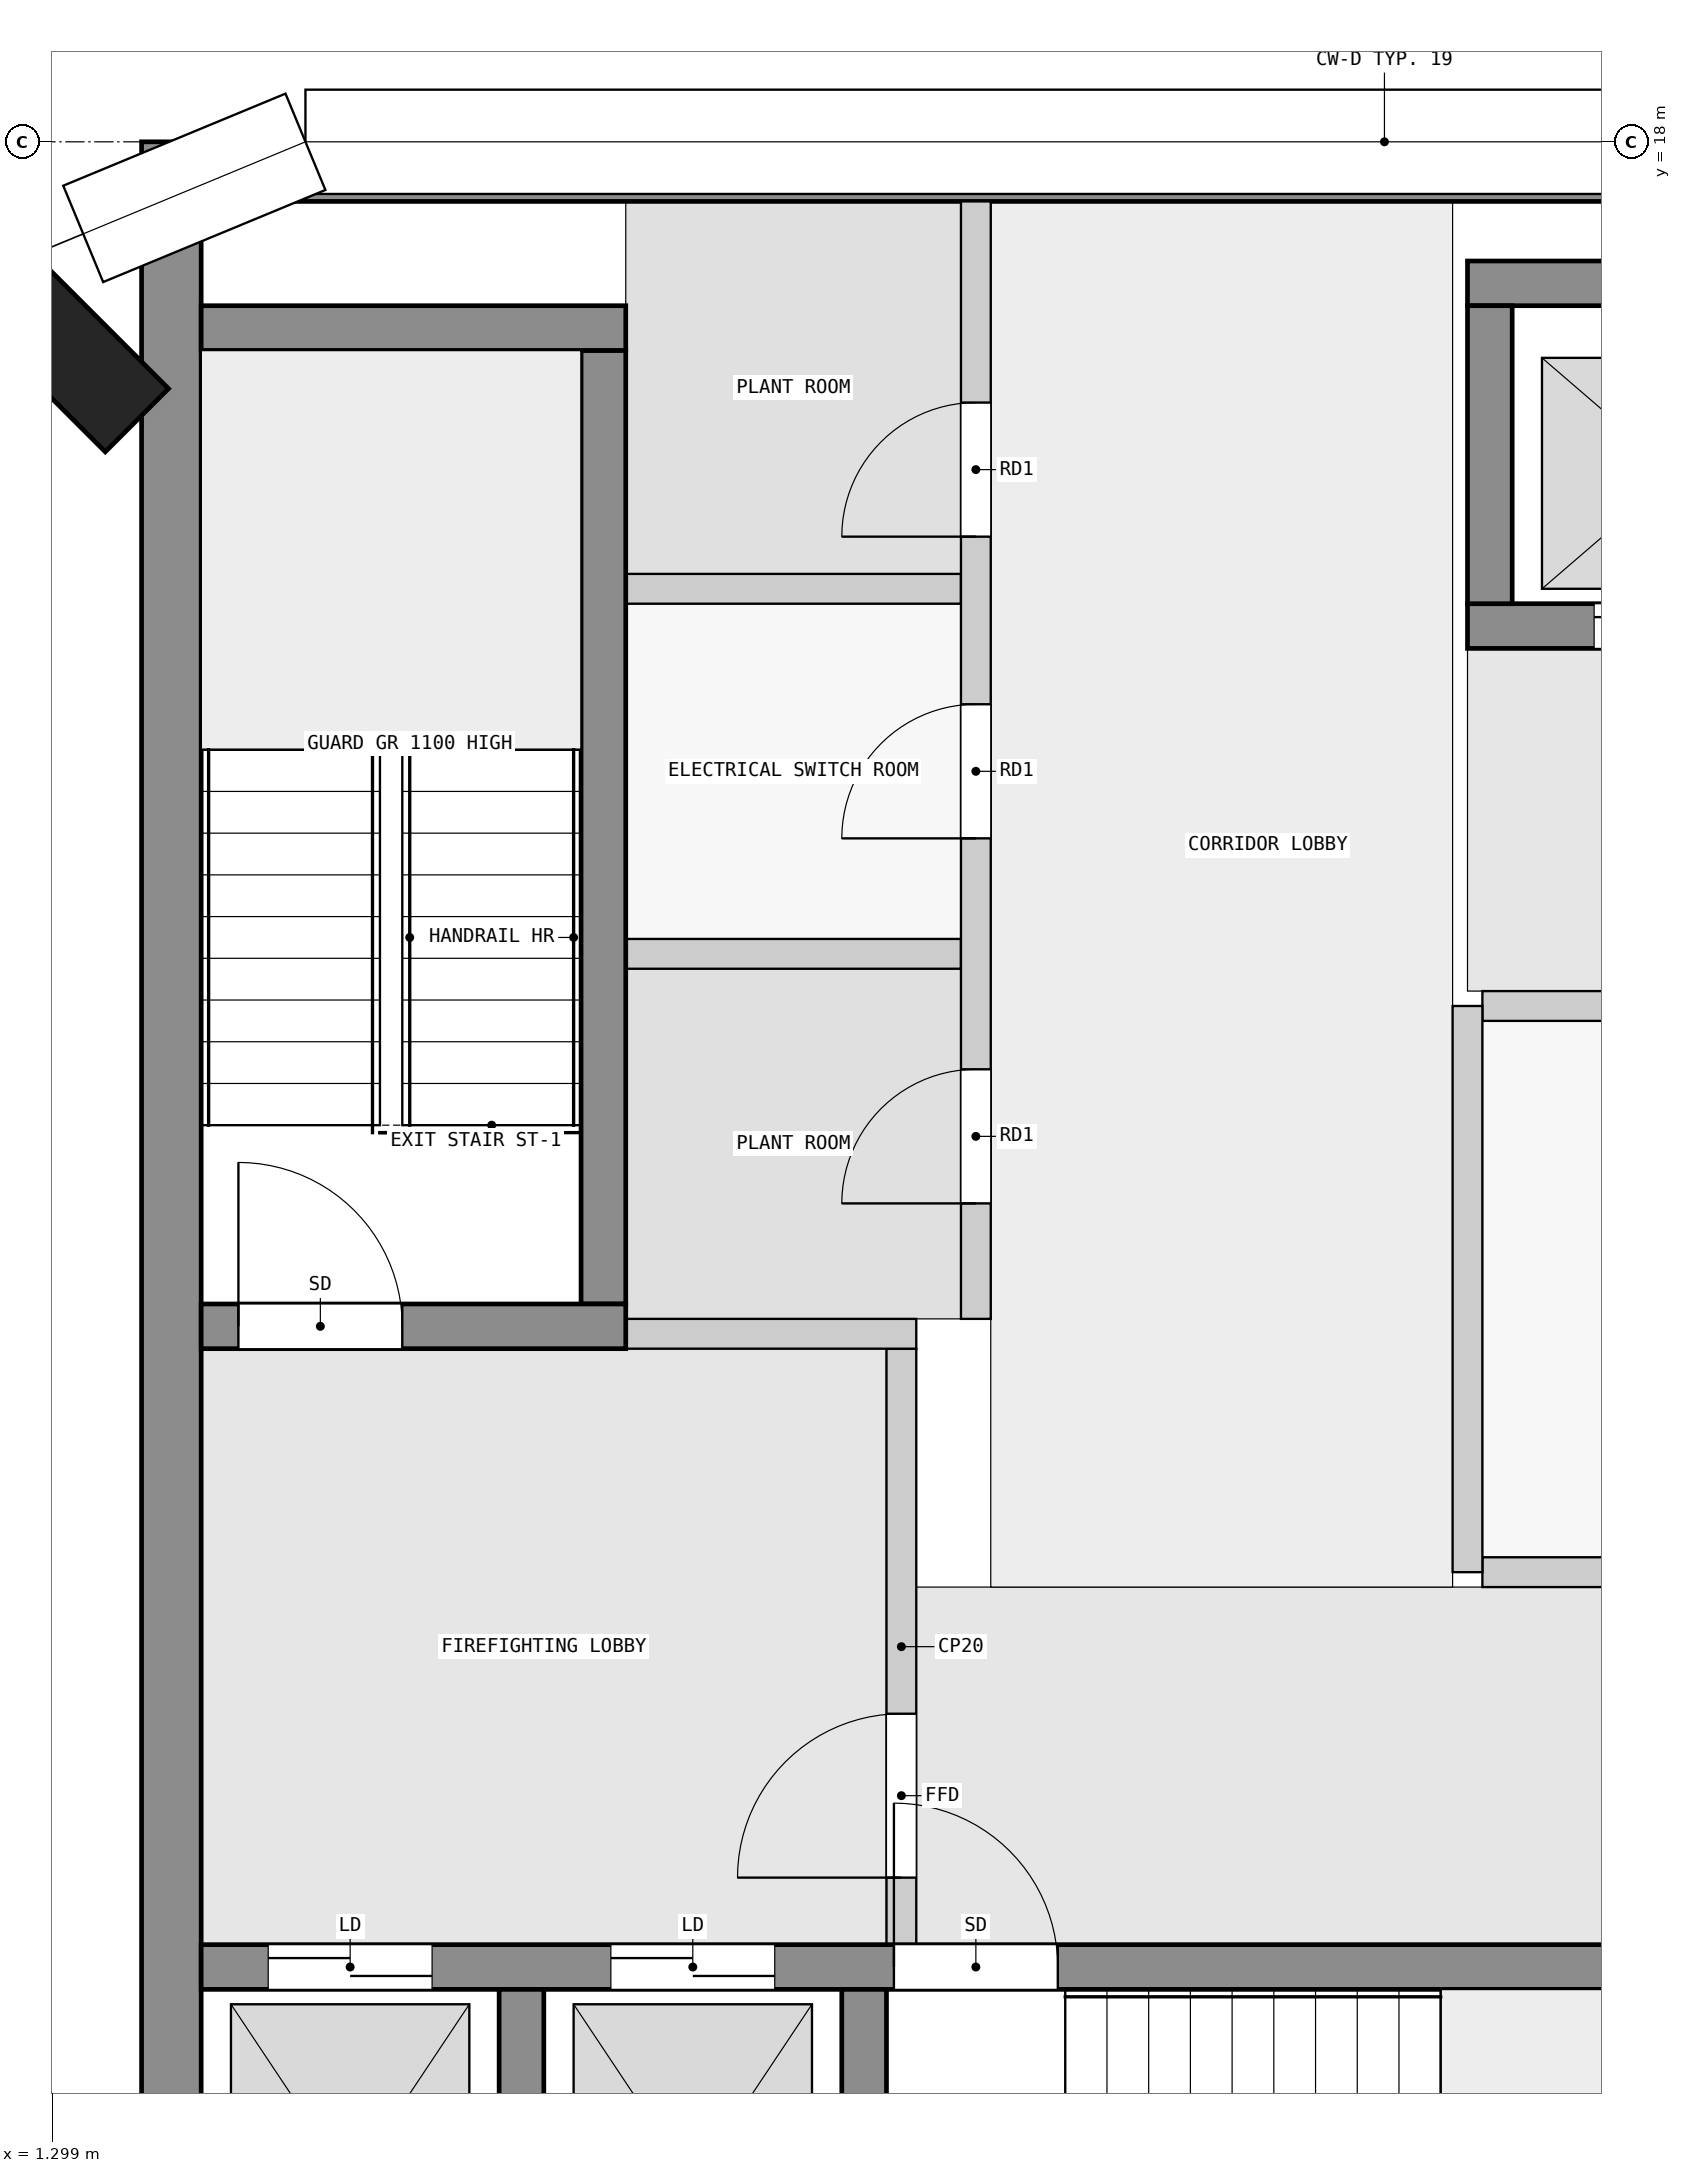
"""IFC4 building model, lengths in metres.
Left out: names, types, materials, properties, quantities, classifications, styles, units other than length and angle.
Written with IfcOpenShell. Run it as: python <this file> out.ifc"""

import sys

from ifc_helpers import new_model, si_unit, direction, frame, frame_2d, origin, origin_2d, place, context, subcontext, project, spatial, rectangle, extrude, element, fill, save


model = new_model("IFC4")
c1 = context("Model", 3, precision=1e-05, world=origin(), true_north=direction((0.0, 1.0)))
c2 = subcontext(c1, "Body", "Model", "MODEL_VIEW")
j1 = project(units=[si_unit("LENGTHUNIT", "METRE"), si_unit("PLANEANGLEUNIT", "RADIAN")], contexts=[c1])
p1 = place(None, origin())
s1 = spatial("IfcSite", under=j1, at=p1, CompositionType="ELEMENT")
p2 = place(p1, origin())
s2 = spatial("IfcBuilding", under=s1, at=p2, CompositionType="ELEMENT")
p3 = place(p2, frame((0.0, 0.0, 308.9)))
s3 = spatial("IfcBuildingStorey", under=s2, at=p3, CompositionType="ELEMENT", Elevation=308.9)
p4 = place(p3, frame((1.374, 16.626, 0.0), z_axis=(0.0, 0.0, 1.0), x_axis=(0.707106781187, 0.707106781187, 0.0)))
e1 = element("IfcColumn", 1, at=p4, inside=s3, PredefinedType="COLUMN", context=c2, shape_type="SweptSolid", body=[
    extrude(rectangle(XDim=0.6, YDim=1.4, at=origin_2d()), origin(), (0.0, 0.0, 1.0), 3.5),
])
p5 = place(p3, frame((1.9, 17.8, 0.0), z_axis=(0.0, 0.0, 1.0), x_axis=(1.0, 0.0, 0.0)))
e2 = element("IfcWall", 2, at=p5, inside=s3, PredefinedType="SHEAR", context=c2, shape_type="SweptSolid", body=[
    extrude(rectangle(XDim=20.6, YDim=0.4, at=frame_2d((10.3, 0.0))), origin(), (0.0, 0.0, 1.0), 3.2),
])
p6 = place(p3, frame((2.1, 2.5, 0.0), z_axis=(0.0, 0.0, 1.0), x_axis=(0.0, 1.0, 0.0)))
e3 = element("IfcWall", 3, at=p6, inside=s3, PredefinedType="SHEAR", context=c2, shape_type="SweptSolid", body=[
    extrude(rectangle(XDim=15.1, YDim=0.4, at=frame_2d((7.55, 0.0))), origin(), (0.0, 0.0, 1.0), 3.2),
])
for number, where, z_axis, x_axis in (
    (4, (4.45, 2.8, 0.0), (0.0, 0.0, 1.0), (0.0, 1.0, 0.0)),
    (5, (6.75, 2.8, 0.0), (0.0, 0.0, 1.0), (0.0, 1.0, 0.0)),
):
    element("IfcWall", number, at=place(p3, frame(where, z_axis=z_axis, x_axis=x_axis)), inside=s3, PredefinedType="SHEAR", context=c2, shape_type="SweptSolid", body=[
        extrude(rectangle(XDim=2.8, YDim=0.3, at=frame_2d((1.4, 0.0))), origin(), (0.0, 0.0, 1.0), 3.2),
    ])
p7 = place(p3, frame((2.3, 5.75, 0.0), z_axis=(0.0, 0.0, 1.0), x_axis=(1.0, 0.0, 0.0)))
e6 = element("IfcWall", 6, at=p7, inside=s3, PredefinedType="SHEAR", context=c2, shape_type="SweptSolid", body=[
    extrude(rectangle(XDim=18.8, YDim=0.3, at=frame_2d((9.4, 0.0))), origin(), (0.0, 0.0, 1.0), 3.2),
])
p8 = place(p7, frame((4.65, 0.0, 0.0)))
e7 = element("IfcOpeningElement", 7, at=p8, cuts=e6, PredefinedType="OPENING", context=c2, shape_type="SweptSolid", body=[
    extrude(rectangle(XDim=1.1, YDim=2.1, at=frame_2d((0.55, 1.05))), frame((0.0, 0.16, 0.0), z_axis=(0.0, -1.0, 0.0), x_axis=(1.0, 0.0, 0.0)), (0.0, 0.0, 1.0), 0.32),
])
p9 = place(p7, frame((0.45, 0.0, 0.0)))
e8 = element("IfcOpeningElement", 8, at=p9, cuts=e6, PredefinedType="OPENING", context=c2, shape_type="SweptSolid", body=[
    extrude(rectangle(XDim=1.1, YDim=2.1, at=frame_2d((0.55, 1.05))), frame((0.0, 0.16, 0.0), z_axis=(0.0, -1.0, 0.0), x_axis=(1.0, 0.0, 0.0)), (0.0, 0.0, 1.0), 0.32),
])
p10 = place(p7, frame((2.75, 0.0, 0.0)))
e9 = element("IfcOpeningElement", 9, at=p10, cuts=e6, PredefinedType="OPENING", context=c2, shape_type="SweptSolid", body=[
    extrude(rectangle(XDim=1.1, YDim=2.1, at=frame_2d((0.55, 1.05))), frame((0.0, 0.16, 0.0), z_axis=(0.0, -1.0, 0.0), x_axis=(1.0, 0.0, 0.0)), (0.0, 0.0, 1.0), 0.32),
])
p11 = place(p7, frame((13.2, 0.0, 0.0)))
e10 = element("IfcOpeningElement", 10, at=p11, cuts=e6, PredefinedType="OPENING", context=c2, shape_type="SweptSolid", body=[
    extrude(rectangle(XDim=0.9, YDim=2.1, at=frame_2d((0.45, 1.05))), frame((0.0, 0.16, 0.0), z_axis=(0.0, -1.0, 0.0), x_axis=(1.0, 0.0, 0.0)), (0.0, 0.0, 1.0), 0.32),
])
p12 = place(p7, frame((16.95, 0.0, 0.0)))
e11 = element("IfcOpeningElement", 11, at=p12, cuts=e6, PredefinedType="OPENING", context=c2, shape_type="SweptSolid", body=[
    extrude(rectangle(XDim=0.9, YDim=2.1, at=frame_2d((0.45, 1.05))), frame((0.0, 0.16, 0.0), z_axis=(0.0, -1.0, 0.0), x_axis=(1.0, 0.0, 0.0)), (0.0, 0.0, 1.0), 0.32),
])
p13 = place(p3, frame((2.3, 10.05, 0.0), z_axis=(0.0, 0.0, 1.0), x_axis=(1.0, 0.0, 0.0)))
e12 = element("IfcWall", 12, at=p13, inside=s3, PredefinedType="SHEAR", context=c2, shape_type="SweptSolid", body=[
    extrude(rectangle(XDim=2.85, YDim=0.3, at=frame_2d((1.425, 0.0))), origin(), (0.0, 0.0, 1.0), 3.2),
])
p14 = place(p13, frame((0.25, 0.0, 0.0)))
e13 = element("IfcOpeningElement", 13, at=p14, cuts=e12, PredefinedType="OPENING", context=c2, shape_type="SweptSolid", body=[
    extrude(rectangle(XDim=1.1, YDim=2.1, at=frame_2d((0.55, 1.05))), frame((0.0, 0.16, 0.0), z_axis=(0.0, -1.0, 0.0), x_axis=(1.0, 0.0, 0.0)), (0.0, 0.0, 1.0), 0.32),
])
p15 = place(p3, frame((5.0, 10.2, 0.0), z_axis=(0.0, 0.0, 1.0), x_axis=(0.0, 1.0, 0.0)))
e14 = element("IfcWall", 14, at=p15, inside=s3, PredefinedType="SHEAR", context=c2, shape_type="SweptSolid", body=[
    extrude(rectangle(XDim=6.4, YDim=0.3, at=frame_2d((3.2, 0.0))), origin(), (0.0, 0.0, 1.0), 3.2),
])
p16 = place(p3, frame((2.3, 16.75, 0.0), z_axis=(0.0, 0.0, 1.0), x_axis=(1.0, 0.0, 0.0)))
e15 = element("IfcWall", 15, at=p16, inside=s3, PredefinedType="SHEAR", context=c2, shape_type="SweptSolid", body=[
    extrude(rectangle(XDim=2.85, YDim=0.3, at=frame_2d((1.425, 0.0))), origin(), (0.0, 0.0, 1.0), 3.2),
])
p17 = place(p3, frame((10.8, 17.05, 0.0), z_axis=(0.0, 0.0, 1.0), x_axis=(1.0, 0.0, 0.0)))
e16 = element("IfcWall", 16, at=p17, inside=s3, PredefinedType="SHEAR", context=c2, shape_type="SweptSolid", body=[
    extrude(rectangle(XDim=7.8, YDim=0.3, at=frame_2d((3.9, 0.0))), origin(), (0.0, 0.0, 1.0), 3.2),
])
p18 = place(p3, frame((10.8, 14.75, 0.0), z_axis=(0.0, 0.0, 1.0), x_axis=(1.0, 0.0, 0.0)))
e17 = element("IfcWall", 17, at=p18, inside=s3, PredefinedType="SHEAR", context=c2, shape_type="SweptSolid", body=[
    extrude(rectangle(XDim=7.8, YDim=0.3, at=frame_2d((3.9, 0.0))), origin(), (0.0, 0.0, 1.0), 3.2),
])
p19 = place(p18, frame((0.85, 0.0, 0.0)))
e18 = element("IfcOpeningElement", 18, at=p19, cuts=e17, PredefinedType="OPENING", context=c2, shape_type="SweptSolid", body=[
    extrude(rectangle(XDim=1.1, YDim=2.1, at=frame_2d((0.55, 1.05))), frame((0.0, 0.16, 0.0), z_axis=(0.0, -1.0, 0.0), x_axis=(1.0, 0.0, 0.0)), (0.0, 0.0, 1.0), 0.32),
])
p20 = place(p18, frame((3.35, 0.0, 0.0)))
e19 = element("IfcOpeningElement", 19, at=p20, cuts=e17, PredefinedType="OPENING", context=c2, shape_type="SweptSolid", body=[
    extrude(rectangle(XDim=1.1, YDim=2.1, at=frame_2d((0.55, 1.05))), frame((0.0, 0.16, 0.0), z_axis=(0.0, -1.0, 0.0), x_axis=(1.0, 0.0, 0.0)), (0.0, 0.0, 1.0), 0.32),
])
p21 = place(p18, frame((5.85, 0.0, 0.0)))
e20 = element("IfcOpeningElement", 20, at=p21, cuts=e17, PredefinedType="OPENING", context=c2, shape_type="SweptSolid", body=[
    extrude(rectangle(XDim=1.1, YDim=2.1, at=frame_2d((0.55, 1.05))), frame((0.0, 0.16, 0.0), z_axis=(0.0, -1.0, 0.0), x_axis=(1.0, 0.0, 0.0)), (0.0, 0.0, 1.0), 0.32),
])
p22 = place(p3, frame((10.95, 14.9, 0.0), z_axis=(0.0, 0.0, 1.0), x_axis=(0.0, 1.0, 0.0)))
e21 = element("IfcWall", 21, at=p22, inside=s3, PredefinedType="SHEAR", context=c2, shape_type="SweptSolid", body=[
    extrude(rectangle(XDim=2.0, YDim=0.3, at=frame_2d((1.0, 0.0))), origin(), (0.0, 0.0, 1.0), 3.2),
])
p23 = place(p3, frame((7.0, 5.9, 0.0), z_axis=(0.0, 0.0, 1.0), x_axis=(0.0, 1.0, 0.0)))
e22 = element("IfcWall", 22, at=p23, inside=s3, PredefinedType="PARTITIONING", context=c2, shape_type="SweptSolid", body=[
    extrude(rectangle(XDim=4.0, YDim=0.2, at=frame_2d((2.0, 0.0))), origin(), (0.0, 0.0, 1.0), 3.2),
])
p24 = place(p23, frame((0.45, 0.0, 0.0)))
e23 = element("IfcOpeningElement", 23, at=p24, cuts=e22, PredefinedType="OPENING", context=c2, shape_type="SweptSolid", body=[
    extrude(rectangle(XDim=1.1, YDim=2.1, at=frame_2d((0.55, 1.05))), frame((0.0, 0.11, 0.0), z_axis=(0.0, -1.0, 0.0), x_axis=(1.0, 0.0, 0.0)), (0.0, 0.0, 1.0), 0.22),
])
p25 = place(p3, frame((5.15, 10.0, 0.0), z_axis=(0.0, 0.0, 1.0), x_axis=(1.0, 0.0, 0.0)))
e24 = element("IfcWall", 24, at=p25, inside=s3, PredefinedType="PARTITIONING", context=c2, shape_type="SweptSolid", body=[
    extrude(rectangle(XDim=1.95, YDim=0.2, at=frame_2d((0.975, 0.0))), origin(), (0.0, 0.0, 1.0), 3.2),
])
p26 = place(p3, frame((10.8, 8.4, 0.0), z_axis=(0.0, 0.0, 1.0), x_axis=(0.0, 1.0, 0.0)))
e25 = element("IfcWall", 25, at=p26, inside=s3, PredefinedType="PARTITIONING", context=c2, shape_type="SweptSolid", body=[
    extrude(rectangle(XDim=3.8, YDim=0.2, at=frame_2d((1.9, 0.0))), origin(), (0.0, 0.0, 1.0), 3.2),
])
p27 = place(p3, frame((10.9, 8.4, 0.0), z_axis=(0.0, 0.0, 1.0), x_axis=(1.0, 0.0, 0.0)))
e26 = element("IfcWall", 26, at=p27, inside=s3, PredefinedType="PARTITIONING", context=c2, shape_type="SweptSolid", body=[
    extrude(rectangle(XDim=8.7, YDim=0.2, at=frame_2d((4.35, 0.0))), origin(), (0.0, 0.0, 1.0), 3.2),
])
p28 = place(p3, frame((10.9, 12.2, 0.0), z_axis=(0.0, 0.0, 1.0), x_axis=(1.0, 0.0, 0.0)))
e27 = element("IfcWall", 27, at=p28, inside=s3, PredefinedType="PARTITIONING", context=c2, shape_type="SweptSolid", body=[
    extrude(rectangle(XDim=8.7, YDim=0.2, at=frame_2d((4.35, 0.0))), origin(), (0.0, 0.0, 1.0), 3.2),
])
p29 = place(p28, frame((3.9, 0.0, 0.0)))
e28 = element("IfcOpeningElement", 28, at=p29, cuts=e27, PredefinedType="OPENING", context=c2, shape_type="SweptSolid", body=[
    extrude(rectangle(XDim=0.9, YDim=2.1, at=frame_2d((0.45, 1.05))), frame((0.0, 0.11, 0.0), z_axis=(0.0, -1.0, 0.0), x_axis=(1.0, 0.0, 0.0)), (0.0, 0.0, 1.0), 0.22),
])
p30 = place(p3, frame((7.5, 10.1, 0.0), z_axis=(0.0, 0.0, 1.0), x_axis=(0.0, 1.0, 0.0)))
e29 = element("IfcWall", 29, at=p30, inside=s3, PredefinedType="PARTITIONING", context=c2, shape_type="SweptSolid", body=[
    extrude(rectangle(XDim=7.5, YDim=0.2, at=frame_2d((3.75, 0.0))), origin(), (0.0, 0.0, 1.0), 3.2),
])
p31 = place(p30, frame((0.775, 0.0, 0.0)))
e30 = element("IfcOpeningElement", 30, at=p31, cuts=e29, PredefinedType="OPENING", context=c2, shape_type="SweptSolid", body=[
    extrude(rectangle(XDim=0.9, YDim=2.1, at=frame_2d((0.45, 1.05))), frame((0.0, 0.11, 0.0), z_axis=(0.0, -1.0, 0.0), x_axis=(1.0, 0.0, 0.0)), (0.0, 0.0, 1.0), 0.22),
])
p32 = place(p30, frame((3.225, 0.0, 0.0)))
e31 = element("IfcOpeningElement", 31, at=p32, cuts=e29, PredefinedType="OPENING", context=c2, shape_type="SweptSolid", body=[
    extrude(rectangle(XDim=0.9, YDim=2.1, at=frame_2d((0.45, 1.05))), frame((0.0, 0.11, 0.0), z_axis=(0.0, -1.0, 0.0), x_axis=(1.0, 0.0, 0.0)), (0.0, 0.0, 1.0), 0.22),
])
p33 = place(p30, frame((5.25, 0.0, 0.0)))
e32 = element("IfcOpeningElement", 32, at=p33, cuts=e29, PredefinedType="OPENING", context=c2, shape_type="SweptSolid", body=[
    extrude(rectangle(XDim=0.9, YDim=2.1, at=frame_2d((0.45, 1.05))), frame((0.0, 0.11, 0.0), z_axis=(0.0, -1.0, 0.0), x_axis=(1.0, 0.0, 0.0)), (0.0, 0.0, 1.0), 0.22),
])
for number, where, z_axis, x_axis in (
    (33, (5.15, 12.55, 0.0), (0.0, 0.0, 1.0), (1.0, 0.0, 0.0)),
    (34, (5.15, 15.0, 0.0), (0.0, 0.0, 1.0), (1.0, 0.0, 0.0)),
):
    element("IfcWall", number, at=place(p3, frame(where, z_axis=z_axis, x_axis=x_axis)), inside=s3, PredefinedType="PARTITIONING", context=c2, shape_type="SweptSolid", body=[
        extrude(rectangle(XDim=2.25, YDim=0.2, at=frame_2d((1.125, 0.0))), origin(), (0.0, 0.0, 1.0), 3.2),
    ])
p34 = place(p24, origin())
e35 = element("IfcDoor", 35, at=p34, inside=s3, OperationType="SINGLE_SWING_LEFT", PredefinedType="DOOR", context=c2, shape_type="SweptSolid", body=[
    extrude(rectangle(XDim=1.1, YDim=2.1, at=frame_2d((0.55, 1.05))), frame((0.0, 0.025, 0.0), z_axis=(0.0, -1.0, 0.0), x_axis=(1.0, 0.0, 0.0)), (0.0, 0.0, 1.0), 0.05),
])
fill(e23, e35)
p35 = place(p14, origin())
e36 = element("IfcDoor", 36, at=p35, inside=s3, OperationType="SINGLE_SWING_RIGHT", PredefinedType="DOOR", context=c2, shape_type="SweptSolid", body=[
    extrude(rectangle(XDim=1.1, YDim=2.1, at=frame_2d((0.55, 1.05))), frame((0.0, 0.025, 0.0), z_axis=(0.0, -1.0, 0.0), x_axis=(1.0, 0.0, 0.0)), (0.0, 0.0, 1.0), 0.05),
])
fill(e13, e36)
p36 = place(p8, origin())
e37 = element("IfcDoor", 37, at=p36, inside=s3, OperationType="SINGLE_SWING_LEFT", PredefinedType="DOOR", context=c2, shape_type="SweptSolid", body=[
    extrude(rectangle(XDim=1.1, YDim=2.1, at=frame_2d((0.55, 1.05))), frame((0.0, 0.025, 0.0), z_axis=(0.0, -1.0, 0.0), x_axis=(1.0, 0.0, 0.0)), (0.0, 0.0, 1.0), 0.05),
])
fill(e7, e37)
p37 = place(p9, origin())
e38 = element("IfcDoor", 38, at=p37, inside=s3, OperationType="DOUBLE_DOOR_SLIDING", PredefinedType="DOOR", context=c2, shape_type="SweptSolid", body=[
    extrude(rectangle(XDim=1.1, YDim=2.1, at=frame_2d((0.55, 1.05))), frame((0.0, 0.025, 0.0), z_axis=(0.0, -1.0, 0.0), x_axis=(1.0, 0.0, 0.0)), (0.0, 0.0, 1.0), 0.05),
])
fill(e8, e38)
p38 = place(p10, origin())
e39 = element("IfcDoor", 39, at=p38, inside=s3, OperationType="DOUBLE_DOOR_SLIDING", PredefinedType="DOOR", context=c2, shape_type="SweptSolid", body=[
    extrude(rectangle(XDim=1.1, YDim=2.1, at=frame_2d((0.55, 1.05))), frame((0.0, 0.025, 0.0), z_axis=(0.0, -1.0, 0.0), x_axis=(1.0, 0.0, 0.0)), (0.0, 0.0, 1.0), 0.05),
])
fill(e9, e39)
p39 = place(p19, origin())
e40 = element("IfcDoor", 40, at=p39, inside=s3, OperationType="DOUBLE_DOOR_SLIDING", PredefinedType="DOOR", context=c2, shape_type="SweptSolid", body=[
    extrude(rectangle(XDim=1.1, YDim=2.1, at=frame_2d((0.55, 1.05))), frame((0.0, 0.025, 0.0), z_axis=(0.0, -1.0, 0.0), x_axis=(1.0, 0.0, 0.0)), (0.0, 0.0, 1.0), 0.05),
])
fill(e18, e40)
p40 = place(p31, origin())
e41 = element("IfcDoor", 41, at=p40, inside=s3, OperationType="SINGLE_SWING_RIGHT", PredefinedType="DOOR", context=c2, shape_type="SweptSolid", body=[
    extrude(rectangle(XDim=0.9, YDim=2.1, at=frame_2d((0.45, 1.05))), frame((0.0, 0.025, 0.0), z_axis=(0.0, -1.0, 0.0), x_axis=(1.0, 0.0, 0.0)), (0.0, 0.0, 1.0), 0.05),
])
fill(e30, e41)
p41 = place(p32, origin())
e42 = element("IfcDoor", 42, at=p41, inside=s3, OperationType="SINGLE_SWING_RIGHT", PredefinedType="DOOR", context=c2, shape_type="SweptSolid", body=[
    extrude(rectangle(XDim=0.9, YDim=2.1, at=frame_2d((0.45, 1.05))), frame((0.0, 0.025, 0.0), z_axis=(0.0, -1.0, 0.0), x_axis=(1.0, 0.0, 0.0)), (0.0, 0.0, 1.0), 0.05),
])
fill(e31, e42)
p42 = place(p33, origin())
e43 = element("IfcDoor", 43, at=p42, inside=s3, OperationType="SINGLE_SWING_RIGHT", PredefinedType="DOOR", context=c2, shape_type="SweptSolid", body=[
    extrude(rectangle(XDim=0.9, YDim=2.1, at=frame_2d((0.45, 1.05))), frame((0.0, 0.025, 0.0), z_axis=(0.0, -1.0, 0.0), x_axis=(1.0, 0.0, 0.0)), (0.0, 0.0, 1.0), 0.05),
])
fill(e32, e43)
save(model, sys.argv[1])
